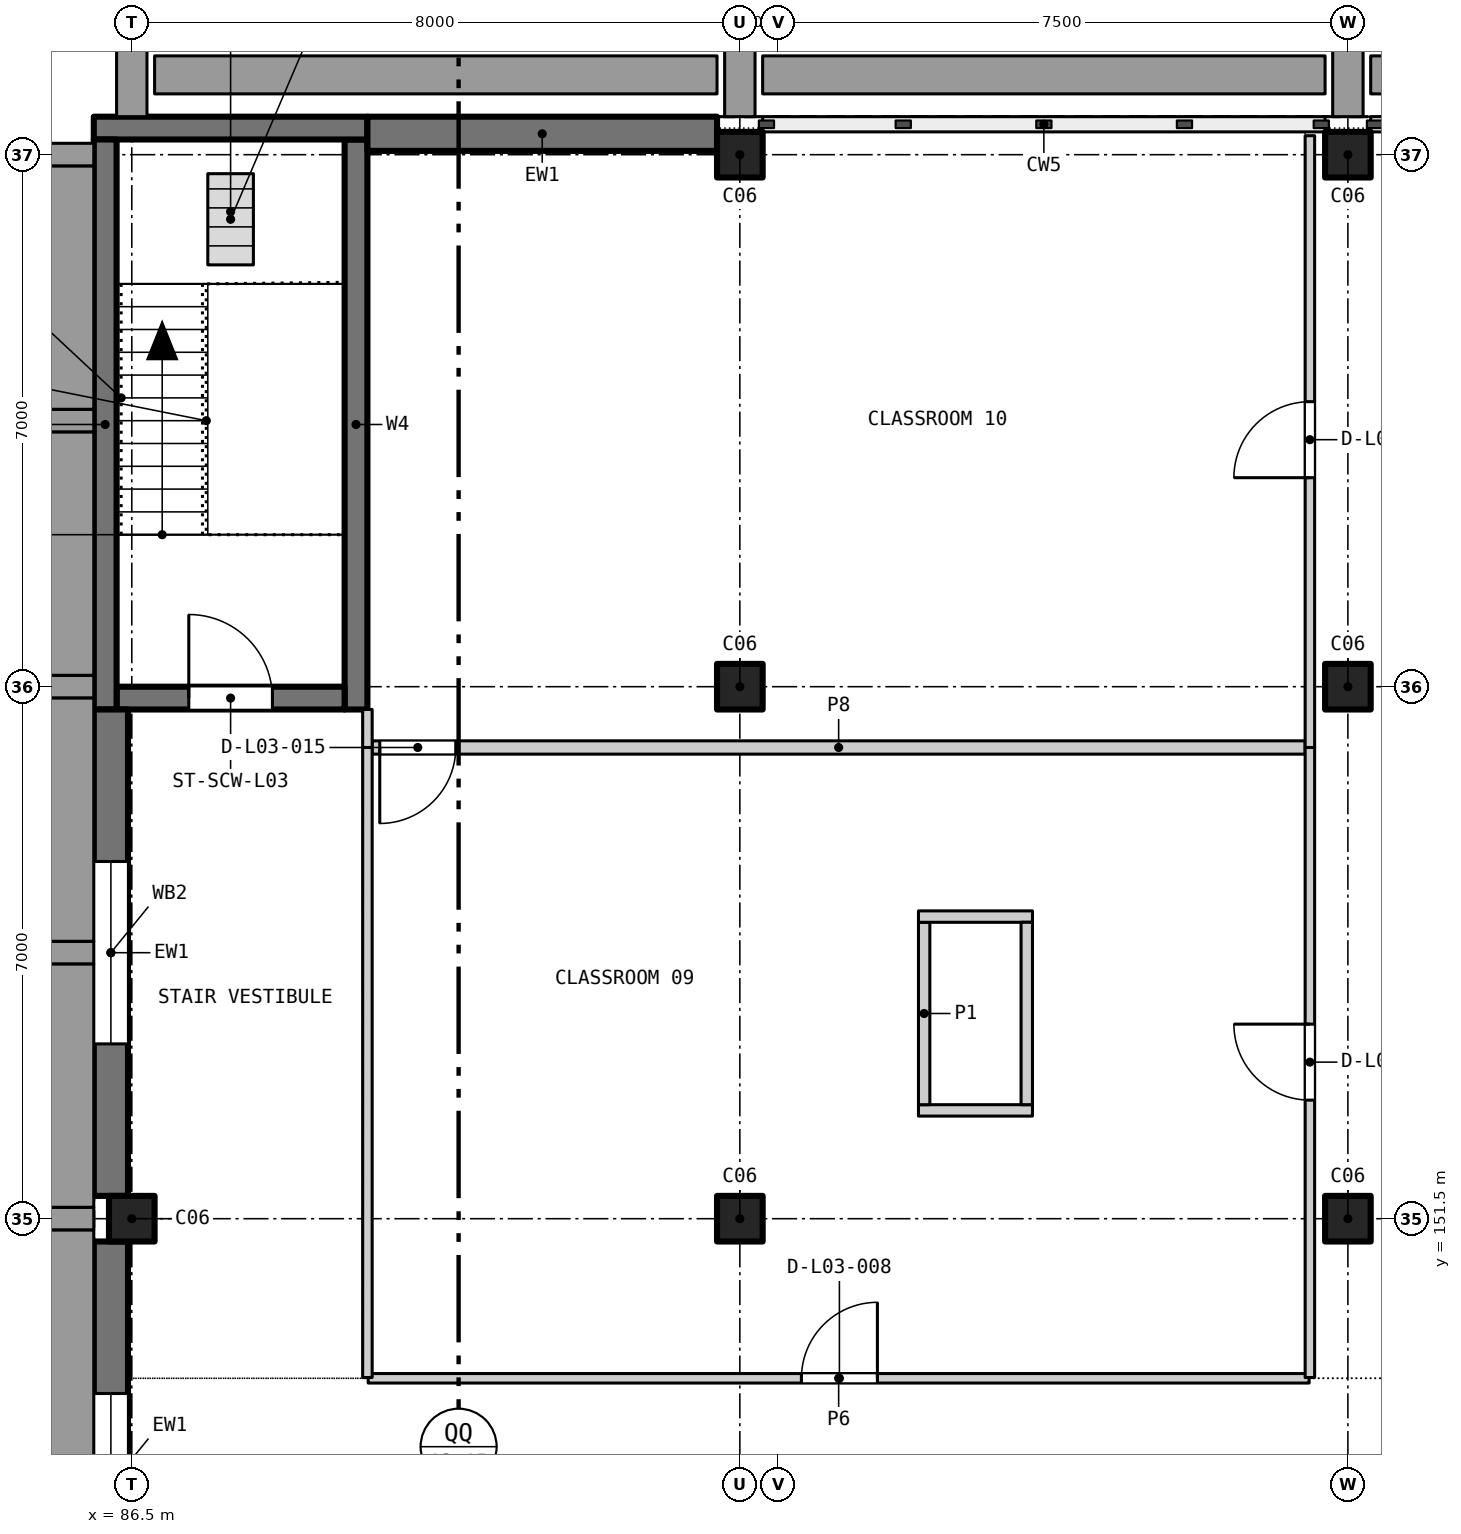
"""IFC4 building model, lengths in metres.
Left out: names, types, materials, properties, quantities, classifications, styles, units other than length and angle.
Written with IfcOpenShell. Run it as: python <this file> out.ifc"""

import sys

from ifc_helpers import new_model, si_unit, direction, frame, frame_2d, origin, origin_2d, place, context, subcontext, project, spatial, rectangle, extrude, element, fill, save


model = new_model("IFC4")
c1 = context("Model", 3, precision=1e-05, world=origin(), true_north=direction((0.0, 1.0)))
c2 = subcontext(c1, "Body", "Model", "MODEL_VIEW")
j1 = project(units=[si_unit("LENGTHUNIT", "METRE"), si_unit("PLANEANGLEUNIT", "RADIAN")], contexts=[c1])
p1 = place(None, origin())
s1 = spatial("IfcSite", under=j1, at=p1, CompositionType="ELEMENT")
p2 = place(p1, origin())
s2 = spatial("IfcBuilding", under=s1, at=p2, CompositionType="ELEMENT")
p3 = place(p2, frame((0.0, 0.0, 14.4)))
s3 = spatial("IfcBuildingStorey", under=s2, at=p3, CompositionType="ELEMENT", Elevation=14.4)
for number, where, z_axis, x_axis in (
    (1, (86.5, 151.5, 0.0), (0.0, 0.0, 1.0), (1.0, 0.0, 0.0)),
    (2, (94.5, 151.5, 0.0), (0.0, 0.0, 1.0), (1.0, 0.0, 0.0)),
    (3, (94.5, 158.5, 0.0), (0.0, 0.0, 1.0), (1.0, 0.0, 0.0)),
    (4, (94.5, 165.5, 0.0), (0.0, 0.0, 1.0), (1.0, 0.0, 0.0)),
    (5, (102.5, 151.5, 0.0), (0.0, 0.0, 1.0), (1.0, 0.0, 0.0)),
    (6, (102.5, 158.5, 0.0), (0.0, 0.0, 1.0), (1.0, 0.0, 0.0)),
    (7, (102.5, 165.5, 0.0), (0.0, 0.0, 1.0), (1.0, 0.0, 0.0)),
):
    element("IfcColumn", number, at=place(p3, frame(where, z_axis=z_axis, x_axis=x_axis)), inside=s3, PredefinedType="COLUMN", context=c2, shape_type="SweptSolid", body=[
        extrude(rectangle(XDim=0.6, YDim=0.6, at=origin_2d()), origin(), (0.0, 0.0, 1.0), 3.9),
    ])
p4 = place(p3, frame((89.45, 158.2, 0.0), z_axis=(0.0, 0.0, 1.0), x_axis=(0.0, 1.0, 0.0)))
e8 = element("IfcWall", 8, at=p4, inside=s3, PredefinedType="SHEAR", context=c2, shape_type="SweptSolid", body=[
    extrude(rectangle(XDim=7.5, YDim=0.3, at=frame_2d((3.75, 0.0))), origin(), (0.0, 0.0, 1.0), 3.9),
])
p5 = place(p3, frame((86.3, 158.35, 0.0), z_axis=(0.0, 0.0, 1.0), x_axis=(1.0, 0.0, 0.0)))
e9 = element("IfcWall", 9, at=p5, inside=s3, PredefinedType="SHEAR", context=c2, shape_type="SweptSolid", body=[
    extrude(rectangle(XDim=3.0, YDim=0.3, at=frame_2d((1.5, 0.0))), origin(), (0.0, 0.0, 1.0), 3.9),
])
p6 = place(p5, frame((0.95, 0.0, 0.0)))
e10 = element("IfcOpeningElement", 10, at=p6, cuts=e9, PredefinedType="OPENING", context=c2, shape_type="SweptSolid", body=[
    extrude(rectangle(XDim=1.1, YDim=2.1, at=frame_2d((0.55, 1.05))), frame((0.0, 0.16, 0.0), z_axis=(0.0, -1.0, 0.0), x_axis=(1.0, 0.0, 0.0)), (0.0, 0.0, 1.0), 0.32),
])
p7 = place(p3, frame((86.0, 165.875, 4.2), z_axis=(0.0, 0.0, 1.0), x_axis=(1.0, 0.0, 0.0)))
e11 = element("IfcWall", 11, at=p7, inside=s3, PredefinedType="PARAPET", context=c2, shape_type="SweptSolid", body=[
    extrude(rectangle(XDim=48.0, YDim=0.25, at=frame_2d((24.0, 0.0))), origin(), (0.0, 0.0, 1.0), 1.1),
])
p8 = place(p3, frame((86.125, 130.25, 4.2), z_axis=(0.0, 0.0, 1.0), x_axis=(0.0, 1.0, 0.0)))
e12 = element("IfcWall", 12, at=p8, inside=s3, PredefinedType="PARAPET", context=c2, shape_type="SweptSolid", body=[
    extrude(rectangle(XDim=35.5, YDim=0.25, at=frame_2d((17.75, 0.0))), origin(), (0.0, 0.0, 1.0), 1.1),
])
p9 = place(p3, frame((86.0, 165.85, 0.0), z_axis=(0.0, 0.0, 1.0), x_axis=(1.0, 0.0, 0.0)))
e13 = element("IfcWall", 13, at=p9, inside=s3, PredefinedType="SOLIDWALL", context=c2, shape_type="SweptSolid", body=[
    extrude(rectangle(XDim=3.6, YDim=0.3, at=frame_2d((1.8, 0.0))), origin(), (0.0, 0.0, 1.0), 3.9),
])
p10 = place(p3, frame((89.6, 165.775, 0.0), z_axis=(0.0, 0.0, 1.0), x_axis=(1.0, 0.0, 0.0)))
e14 = element("IfcWall", 14, at=p10, inside=s3, PredefinedType="SOLIDWALL", context=c2, shape_type="SweptSolid", body=[
    extrude(rectangle(XDim=4.6, YDim=0.45, at=frame_2d((2.3, 0.0))), origin(), (0.0, 0.0, 1.0), 3.0),
])
p11 = place(p3, frame((86.15, 158.2, 0.0), z_axis=(0.0, 0.0, 1.0), x_axis=(0.0, 1.0, 0.0)))
e15 = element("IfcWall", 15, at=p11, inside=s3, PredefinedType="SOLIDWALL", context=c2, shape_type="SweptSolid", body=[
    extrude(rectangle(XDim=7.5, YDim=0.3, at=frame_2d((3.75, 0.0))), origin(), (0.0, 0.0, 1.0), 3.9),
])
p12 = place(p3, frame((86.225, 144.8, 0.0), z_axis=(0.0, 0.0, 1.0), x_axis=(0.0, 1.0, 0.0)))
e16 = element("IfcWall", 16, at=p12, inside=s3, PredefinedType="SOLIDWALL", context=c2, shape_type="SweptSolid", body=[
    extrude(rectangle(XDim=6.4, YDim=0.45, at=frame_2d((3.2, 0.0))), origin(), (0.0, 0.0, 1.0), 3.1),
])
p13 = place(p12, frame((2.0, 0.0, 0.9)))
e17 = element("IfcOpeningElement", 17, at=p13, cuts=e16, PredefinedType="OPENING", context=c2, shape_type="SweptSolid", body=[
    extrude(rectangle(XDim=2.4, YDim=1.6, at=frame_2d((1.2, 0.8))), frame((0.0, 0.235, 0.0), z_axis=(0.0, -1.0, 0.0), x_axis=(1.0, 0.0, 0.0)), (0.0, 0.0, 1.0), 0.47),
])
p14 = place(p3, frame((86.225, 151.8, 0.0), z_axis=(0.0, 0.0, 1.0), x_axis=(0.0, 1.0, 0.0)))
e18 = element("IfcWall", 18, at=p14, inside=s3, PredefinedType="SOLIDWALL", context=c2, shape_type="SweptSolid", body=[
    extrude(rectangle(XDim=6.4, YDim=0.45, at=frame_2d((3.2, 0.0))), origin(), (0.0, 0.0, 1.0), 3.1),
])
p15 = place(p14, frame((2.0, 0.0, 0.9)))
e19 = element("IfcOpeningElement", 19, at=p15, cuts=e18, PredefinedType="OPENING", context=c2, shape_type="SweptSolid", body=[
    extrude(rectangle(XDim=2.4, YDim=1.6, at=frame_2d((1.2, 0.8))), frame((0.0, 0.235, 0.0), z_axis=(0.0, -1.0, 0.0), x_axis=(1.0, 0.0, 0.0)), (0.0, 0.0, 1.0), 0.47),
])
p16 = place(p3, frame((96.85, 152.925, 0.0), z_axis=(0.0, 0.0, 1.0), x_axis=(1.0, 0.0, 0.0)))
e20 = element("IfcWall", 20, at=p16, inside=s3, PredefinedType="PARTITIONING", context=c2, shape_type="SweptSolid", body=[
    extrude(rectangle(XDim=1.5, YDim=0.15, at=frame_2d((0.75, 0.0))), origin(), (0.0, 0.0, 1.0), 3.9),
])
p17 = place(p3, frame((96.925, 153.0, 0.0), z_axis=(0.0, 0.0, 1.0), x_axis=(0.0, 1.0, 0.0)))
e21 = element("IfcWall", 21, at=p17, inside=s3, PredefinedType="PARTITIONING", context=c2, shape_type="SweptSolid", body=[
    extrude(rectangle(XDim=2.4, YDim=0.15, at=frame_2d((1.2, 0.0))), origin(), (0.0, 0.0, 1.0), 3.9),
])
p18 = place(p3, frame((96.85, 155.475, 0.0), z_axis=(0.0, 0.0, 1.0), x_axis=(1.0, 0.0, 0.0)))
e22 = element("IfcWall", 22, at=p18, inside=s3, PredefinedType="PARTITIONING", context=c2, shape_type="SweptSolid", body=[
    extrude(rectangle(XDim=1.5, YDim=0.15, at=frame_2d((0.75, 0.0))), origin(), (0.0, 0.0, 1.0), 3.9),
])
p19 = place(p3, frame((98.275, 153.0, 0.0), z_axis=(0.0, 0.0, 1.0), x_axis=(0.0, 1.0, 0.0)))
e23 = element("IfcWall", 23, at=p19, inside=s3, PredefinedType="PARTITIONING", context=c2, shape_type="SweptSolid", body=[
    extrude(rectangle(XDim=2.4, YDim=0.15, at=frame_2d((1.2, 0.0))), origin(), (0.0, 0.0, 1.0), 3.9),
])
p20 = place(p3, frame((89.61, 149.4, 0.0), z_axis=(0.0, 0.0, 1.0), x_axis=(1.0, 0.0, 0.0)))
e24 = element("IfcWall", 24, at=p20, inside=s3, PredefinedType="PARTITIONING", context=c2, shape_type="SweptSolid", body=[
    extrude(rectangle(XDim=12.38, YDim=0.125, at=frame_2d((6.19, 0.0))), origin(), (0.0, 0.0, 1.0), 3.9),
])
p21 = place(p20, frame((5.7, 0.0, 0.0)))
e25 = element("IfcOpeningElement", 25, at=p21, cuts=e24, PredefinedType="OPENING", context=c2, shape_type="SweptSolid", body=[
    extrude(rectangle(XDim=1.0, YDim=2.1, at=frame_2d((0.5, 1.05))), frame((0.0, 0.073, 0.0), z_axis=(0.0, -1.0, 0.0), x_axis=(1.0, 0.0, 0.0)), (0.0, 0.0, 1.0), 0.145),
])
p22 = place(p3, frame((89.663, 157.7, 0.0), z_axis=(0.0, 0.0, 1.0), x_axis=(1.0, 0.0, 0.0)))
e26 = element("IfcWall", 26, at=p22, inside=s3, PredefinedType="PARTITIONING", context=c2, shape_type="SweptSolid", body=[
    extrude(rectangle(XDim=12.275, YDim=0.175, at=frame_2d((6.137, 0.0))), origin(), (0.0, 0.0, 1.0), 3.9),
])
p23 = place(p22, frame((0.1, 0.0, 0.0)))
e27 = element("IfcOpeningElement", 27, at=p23, cuts=e26, PredefinedType="OPENING", context=c2, shape_type="SweptSolid", body=[
    extrude(rectangle(XDim=1.0, YDim=2.1, at=frame_2d((0.5, 1.05))), frame((0.0, 0.097, 0.0), z_axis=(0.0, -1.0, 0.0), x_axis=(1.0, 0.0, 0.0)), (0.0, 0.0, 1.0), 0.195),
])
p24 = place(p3, frame((89.6, 149.41, 0.0), z_axis=(0.0, 0.0, 1.0), x_axis=(0.0, 1.0, 0.0)))
e28 = element("IfcWall", 28, at=p24, inside=s3, PredefinedType="PARTITIONING", context=c2, shape_type="SweptSolid", body=[
    extrude(rectangle(XDim=8.29, YDim=0.125, at=frame_2d((4.145, 0.0))), origin(), (0.0, 0.0, 1.0), 3.9),
])
p25 = place(p3, frame((89.6, 157.7, 0.0), z_axis=(0.0, 0.0, 1.0), x_axis=(0.0, 1.0, 0.0)))
e29 = element("IfcWall", 29, at=p25, inside=s3, PredefinedType="PARTITIONING", context=c2, shape_type="SweptSolid", body=[
    extrude(rectangle(XDim=0.5, YDim=0.125, at=frame_2d((0.25, 0.0))), origin(), (0.0, 0.0, 1.0), 3.9),
])
p26 = place(p3, frame((102.0, 149.41, 0.0), z_axis=(0.0, 0.0, 1.0), x_axis=(0.0, 1.0, 0.0)))
e30 = element("IfcWall", 30, at=p26, inside=s3, PredefinedType="PARTITIONING", context=c2, shape_type="SweptSolid", body=[
    extrude(rectangle(XDim=8.29, YDim=0.125, at=frame_2d((4.145, 0.0))), origin(), (0.0, 0.0, 1.0), 3.9),
])
p27 = place(p26, frame((3.65, 0.0, 0.0)))
e31 = element("IfcOpeningElement", 31, at=p27, cuts=e30, PredefinedType="OPENING", context=c2, shape_type="SweptSolid", body=[
    extrude(rectangle(XDim=1.0, YDim=2.1, at=frame_2d((0.5, 1.05))), frame((0.0, 0.073, 0.0), z_axis=(0.0, -1.0, 0.0), x_axis=(1.0, 0.0, 0.0)), (0.0, 0.0, 1.0), 0.145),
])
p28 = place(p3, frame((102.0, 157.7, 0.0), z_axis=(0.0, 0.0, 1.0), x_axis=(0.0, 1.0, 0.0)))
e32 = element("IfcWall", 32, at=p28, inside=s3, PredefinedType="PARTITIONING", context=c2, shape_type="SweptSolid", body=[
    extrude(rectangle(XDim=8.05, YDim=0.125, at=frame_2d((4.025, 0.0))), origin(), (0.0, 0.0, 1.0), 3.9),
])
p29 = place(p28, frame((3.55, 0.0, 0.0)))
e33 = element("IfcOpeningElement", 33, at=p29, cuts=e32, PredefinedType="OPENING", context=c2, shape_type="SweptSolid", body=[
    extrude(rectangle(XDim=1.0, YDim=2.1, at=frame_2d((0.5, 1.05))), frame((0.0, 0.073, 0.0), z_axis=(0.0, -1.0, 0.0), x_axis=(1.0, 0.0, 0.0)), (0.0, 0.0, 1.0), 0.145),
])
p30 = place(p13, origin())
e34 = element("IfcWindow", 34, at=p30, inside=s3, PartitioningType="SINGLE_PANEL", PredefinedType="WINDOW", context=c2, shape_type="SweptSolid", body=[
    extrude(rectangle(XDim=2.4, YDim=1.6, at=frame_2d((1.2, 0.8))), frame((0.0, -0.125, 0.0), z_axis=(0.0, -1.0, 0.0), x_axis=(1.0, 0.0, 0.0)), (0.0, 0.0, 1.0), 0.06),
])
fill(e17, e34)
p31 = place(p15, origin())
e35 = element("IfcWindow", 35, at=p31, inside=s3, PartitioningType="SINGLE_PANEL", PredefinedType="WINDOW", context=c2, shape_type="SweptSolid", body=[
    extrude(rectangle(XDim=2.4, YDim=1.6, at=frame_2d((1.2, 0.8))), frame((0.0, -0.125, 0.0), z_axis=(0.0, -1.0, 0.0), x_axis=(1.0, 0.0, 0.0)), (0.0, 0.0, 1.0), 0.06),
])
fill(e19, e35)
p32 = place(p21, origin())
e36 = element("IfcDoor", 36, at=p32, inside=s3, OperationType="SINGLE_SWING_RIGHT", PredefinedType="DOOR", context=c2, shape_type="SweptSolid", body=[
    extrude(rectangle(XDim=1.0, YDim=2.1, at=frame_2d((0.5, 1.05))), frame((0.0, 0.025, 0.0), z_axis=(0.0, -1.0, 0.0), x_axis=(1.0, 0.0, 0.0)), (0.0, 0.0, 1.0), 0.05),
])
fill(e25, e36)
p33 = place(p27, origin())
e37 = element("IfcDoor", 37, at=p33, inside=s3, OperationType="SINGLE_SWING_RIGHT", PredefinedType="DOOR", context=c2, shape_type="SweptSolid", body=[
    extrude(rectangle(XDim=1.0, YDim=2.1, at=frame_2d((0.5, 1.05))), frame((0.0, 0.025, 0.0), z_axis=(0.0, -1.0, 0.0), x_axis=(1.0, 0.0, 0.0)), (0.0, 0.0, 1.0), 0.05),
])
fill(e31, e37)
p34 = place(p23, frame((1.0, 0.0, 0.0), z_axis=(0.0, 0.0, 1.0), x_axis=(-1.0, 0.0, 0.0)))
e38 = element("IfcDoor", 38, at=p34, inside=s3, OperationType="SINGLE_SWING_RIGHT", PredefinedType="DOOR", context=c2, shape_type="SweptSolid", body=[
    extrude(rectangle(XDim=1.0, YDim=2.1, at=frame_2d((0.5, 1.05))), frame((0.0, 0.025, 0.0), z_axis=(0.0, -1.0, 0.0), x_axis=(1.0, 0.0, 0.0)), (0.0, 0.0, 1.0), 0.05),
])
fill(e27, e38)
p35 = place(p29, origin())
e39 = element("IfcDoor", 39, at=p35, inside=s3, OperationType="SINGLE_SWING_LEFT", PredefinedType="DOOR", context=c2, shape_type="SweptSolid", body=[
    extrude(rectangle(XDim=1.0, YDim=2.1, at=frame_2d((0.5, 1.05))), frame((0.0, 0.025, 0.0), z_axis=(0.0, -1.0, 0.0), x_axis=(1.0, 0.0, 0.0)), (0.0, 0.0, 1.0), 0.05),
])
fill(e33, e39)
p36 = place(p6, origin())
e40 = element("IfcDoor", 40, at=p36, inside=s3, OperationType="SINGLE_SWING_LEFT", PredefinedType="DOOR", context=c2, shape_type="SweptSolid", body=[
    extrude(rectangle(XDim=1.1, YDim=2.1, at=frame_2d((0.55, 1.05))), frame((0.0, 0.025, 0.0), z_axis=(0.0, -1.0, 0.0), x_axis=(1.0, 0.0, 0.0)), (0.0, 0.0, 1.0), 0.05),
])
fill(e10, e40)
save(model, sys.argv[1])
